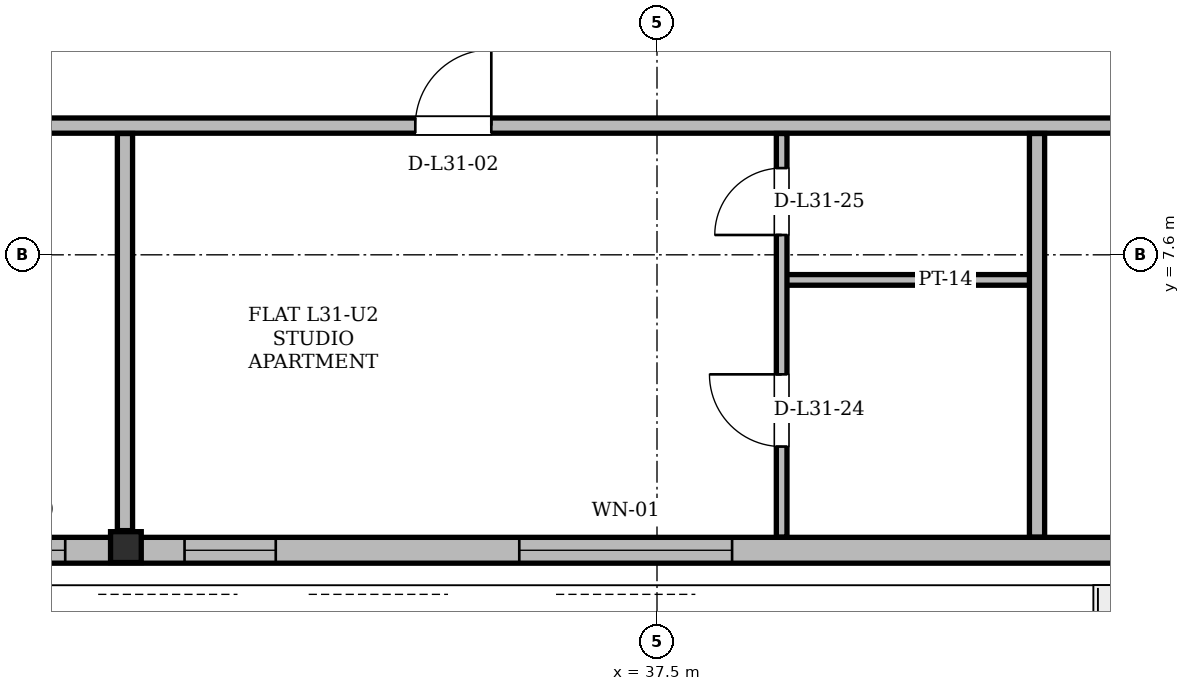
"""IFC4 building model, lengths in metres.
Left out: names, types, materials, properties, quantities, classifications, styles, units other than length and angle.
Written with IfcOpenShell. Run it as: python <this file> out.ifc"""

import sys

from ifc_helpers import new_model, si_unit, direction, frame, frame_2d, origin, origin_2d, place, context, subcontext, project, spatial, rectangle, i_section, extrude, element, fill, save


model = new_model("IFC4")
c1 = context("Model", 3, precision=1e-05, world=origin(), true_north=direction((0.0, 1.0)))
c2 = subcontext(c1, "Body", "Model", "MODEL_VIEW")
j1 = project(units=[si_unit("LENGTHUNIT", "METRE"), si_unit("PLANEANGLEUNIT", "RADIAN")], contexts=[c1])
p1 = place(None, origin())
s1 = spatial("IfcSite", under=j1, at=p1, CompositionType="ELEMENT")
p2 = place(p1, origin())
s2 = spatial("IfcBuilding", under=s1, at=p2, CompositionType="ELEMENT")
p3 = place(p2, frame((0.0, 0.0, 119.4)))
s3 = spatial("IfcBuildingStorey", under=s2, at=p3, CompositionType="ELEMENT", Elevation=119.4)
p4 = place(p3, frame((30.52, 3.713, 0.005), z_axis=(-0.00414597118, 0.023176658563, 0.999722788287), x_axis=(-0.984374005886, -0.176090364689, 0.0)))
e1 = element("IfcColumn", 1, at=p4, inside=s3, PredefinedType="COLUMN", context=c2, shape_type="SweptSolid", body=[
    extrude(i_section(OverallWidth=0.404, OverallDepth=0.406, WebThickness=0.027, FlangeThickness=0.044, at=origin_2d()), origin(), (0.0, 0.0, 1.0), 3.592),
])
p5 = place(p3, frame((20.049, 3.713, 0.0), z_axis=(0.0, 0.0, 1.0), x_axis=(1.0, 0.0, 0.0)))
e2 = element("IfcWall", 2, at=p5, inside=s3, PredefinedType="SOLIDWALL", context=c2, shape_type="SweptSolid", body=[
    extrude(rectangle(XDim=34.901, YDim=0.34, at=frame_2d((17.451, 0.0))), origin(), (0.0, 0.0, 1.0), 2.578),
])
p6 = place(p5, frame((6.369, 0.0, 0.0)))
e3 = element("IfcOpeningElement", 3, at=p6, cuts=e2, PredefinedType="OPENING", context=c2, shape_type="SweptSolid", body=[
    extrude(rectangle(XDim=1.5, YDim=2.2, at=frame_2d((0.75, 1.1))), frame((0.0, 0.17, 0.0), z_axis=(0.0, -1.0, 0.0), x_axis=(1.0, 0.0, 0.0)), (0.0, 0.0, 1.0), 0.34),
])
p7 = place(p5, frame((25.367, 0.0, 0.0)))
e4 = element("IfcOpeningElement", 4, at=p7, cuts=e2, PredefinedType="OPENING", context=c2, shape_type="SweptSolid", body=[
    extrude(rectangle(XDim=1.5, YDim=2.2, at=frame_2d((0.75, 1.1))), frame((0.0, 0.17, 0.0), z_axis=(0.0, -1.0, 0.0), x_axis=(1.0, 0.0, 0.0)), (0.0, 0.0, 1.0), 0.34),
])
p8 = place(p5, frame((2.388, 0.0, 0.85)))
e5 = element("IfcOpeningElement", 5, at=p8, cuts=e2, PredefinedType="OPENING", context=c2, shape_type="SweptSolid", body=[
    extrude(rectangle(XDim=1.6, YDim=1.618, at=frame_2d((0.8, 0.809))), frame((0.0, 0.17, 0.0), z_axis=(0.0, -1.0, 0.0), x_axis=(1.0, 0.0, 0.0)), (0.0, 0.0, 1.0), 0.34),
])
p9 = place(p5, frame((8.465, 0.0, 0.85)))
e6 = element("IfcOpeningElement", 6, at=p9, cuts=e2, PredefinedType="OPENING", context=c2, shape_type="SweptSolid", body=[
    extrude(rectangle(XDim=1.2, YDim=1.48, at=frame_2d((0.6, 0.74))), frame((0.0, 0.17, 0.0), z_axis=(0.0, -1.0, 0.0), x_axis=(1.0, 0.0, 0.0)), (0.0, 0.0, 1.0), 0.34),
])
p10 = place(p5, frame((11.235, 0.0, 0.85)))
e7 = element("IfcOpeningElement", 7, at=p10, cuts=e2, PredefinedType="OPENING", context=c2, shape_type="SweptSolid", body=[
    extrude(rectangle(XDim=1.2, YDim=1.48, at=frame_2d((0.6, 0.74))), frame((0.0, 0.17, 0.0), z_axis=(0.0, -1.0, 0.0), x_axis=(1.0, 0.0, 0.0)), (0.0, 0.0, 1.0), 0.34),
])
p11 = place(p5, frame((15.639, 0.0, 0.85)))
e8 = element("IfcOpeningElement", 8, at=p11, cuts=e2, PredefinedType="OPENING", context=c2, shape_type="SweptSolid", body=[
    extrude(rectangle(XDim=2.8, YDim=1.618, at=frame_2d((1.4, 0.809))), frame((0.0, 0.17, 0.0), z_axis=(0.0, -1.0, 0.0), x_axis=(1.0, 0.0, 0.0)), (0.0, 0.0, 1.0), 0.34),
])
p12 = place(p5, frame((30.113, 0.0, 0.85)))
e9 = element("IfcOpeningElement", 9, at=p12, cuts=e2, PredefinedType="OPENING", context=c2, shape_type="SweptSolid", body=[
    extrude(rectangle(XDim=2.2, YDim=1.618, at=frame_2d((1.1, 0.809))), frame((0.0, 0.17, 0.0), z_axis=(0.0, -1.0, 0.0), x_axis=(1.0, 0.0, 0.0)), (0.0, 0.0, 1.0), 0.34),
])
p13 = place(p3, frame((39.14, 7.27, 0.0), z_axis=(0.0, 0.0, 1.0), x_axis=(1.0, 0.0, 0.0)))
e10 = element("IfcWall", 10, at=p13, inside=s3, PredefinedType="PARTITIONING", context=c2, shape_type="SweptSolid", body=[
    extrude(rectangle(XDim=3.41, YDim=0.14, at=frame_2d((1.705, 0.0))), origin(), (0.0, 0.0, 1.0), 3.36),
])
p14 = place(p3, frame((19.6, 9.3, 0.0), z_axis=(0.0, 0.0, 1.0), x_axis=(1.0, 0.0, 0.0)))
e11 = element("IfcWall", 11, at=p14, inside=s3, PredefinedType="PARTITIONING", context=c2, shape_type="SweptSolid", body=[
    extrude(rectangle(XDim=30.4, YDim=0.2, at=frame_2d((15.2, 0.0))), origin(), (0.0, 0.0, 1.0), 2.814),
])
p15 = place(p14, frame((5.79, 0.0, 0.0)))
e12 = element("IfcOpeningElement", 12, at=p15, cuts=e11, PredefinedType="OPENING", context=c2, shape_type="SweptSolid", body=[
    extrude(rectangle(XDim=1.0, YDim=2.18, at=frame_2d((0.5, 1.09))), frame((0.0, 0.1, 0.0), z_axis=(0.0, -1.0, 0.0), x_axis=(1.0, 0.0, 0.0)), (0.0, 0.0, 1.0), 0.2),
])
p16 = place(p14, frame((14.72, 0.0, 0.0)))
e13 = element("IfcOpeningElement", 13, at=p16, cuts=e11, PredefinedType="OPENING", context=c2, shape_type="SweptSolid", body=[
    extrude(rectangle(XDim=1.0, YDim=2.18, at=frame_2d((0.5, 1.09))), frame((0.0, 0.1, 0.0), z_axis=(0.0, -1.0, 0.0), x_axis=(1.0, 0.0, 0.0)), (0.0, 0.0, 1.0), 0.2),
])
p17 = place(p14, frame((26.576, 0.0, 0.0)))
e14 = element("IfcOpeningElement", 14, at=p17, cuts=e11, PredefinedType="OPENING", context=c2, shape_type="SweptSolid", body=[
    extrude(rectangle(XDim=1.0, YDim=2.18, at=frame_2d((0.5, 1.09))), frame((0.0, 0.1, 0.0), z_axis=(0.0, -1.0, 0.0), x_axis=(1.0, 0.0, 0.0)), (0.0, 0.0, 1.0), 0.2),
])
p18 = place(p3, frame((30.5, 3.972, 0.0), z_axis=(0.0, 0.0, 1.0), x_axis=(0.0, 1.0, 0.0)))
e15 = element("IfcWall", 15, at=p18, inside=s3, PredefinedType="PARTITIONING", context=c2, shape_type="SweptSolid", body=[
    extrude(rectangle(XDim=5.224, YDim=0.2, at=frame_2d((2.612, 0.0))), origin(), (0.0, 0.0, 1.0), 3.36),
])
p19 = place(p3, frame((39.14, 3.887, 0.0), z_axis=(0.0, 0.0, 1.0), x_axis=(0.0, 1.0, 0.0)))
e16 = element("IfcWall", 16, at=p19, inside=s3, PredefinedType="PARTITIONING", context=c2, shape_type="SweptSolid", body=[
    extrude(rectangle(XDim=5.309, YDim=0.14, at=frame_2d((2.655, 0.0))), origin(), (0.0, 0.0, 1.0), 3.36),
])
p20 = place(p19, frame((1.19, 0.0, 0.0)))
e17 = element("IfcOpeningElement", 17, at=p20, cuts=e16, PredefinedType="OPENING", context=c2, shape_type="SweptSolid", body=[
    extrude(rectangle(XDim=0.95, YDim=2.1, at=frame_2d((0.475, 1.05))), frame((0.0, 0.07, 0.0), z_axis=(0.0, -1.0, 0.0), x_axis=(1.0, 0.0, 0.0)), (0.0, 0.0, 1.0), 0.14),
])
p21 = place(p19, frame((3.974, 0.0, 0.0)))
e18 = element("IfcOpeningElement", 18, at=p21, cuts=e16, PredefinedType="OPENING", context=c2, shape_type="SweptSolid", body=[
    extrude(rectangle(XDim=0.88, YDim=2.08, at=frame_2d((0.44, 1.04))), frame((0.0, 0.07, 0.0), z_axis=(0.0, -1.0, 0.0), x_axis=(1.0, 0.0, 0.0)), (0.0, 0.0, 1.0), 0.14),
])
p22 = place(p3, frame((42.5, 3.887, 0.0), z_axis=(0.0, 0.0, 1.0), x_axis=(0.0, 1.0, 0.0)))
e19 = element("IfcWall", 19, at=p22, inside=s3, PredefinedType="PARTITIONING", context=c2, shape_type="SweptSolid", body=[
    extrude(rectangle(XDim=5.309, YDim=0.2, at=frame_2d((2.655, 0.0))), origin(), (0.0, 0.0, 1.0), 2.946),
])
p23 = place(p9, origin())
e20 = element("IfcWindow", 20, at=p23, inside=s3, PartitioningType="SINGLE_PANEL", PredefinedType="WINDOW", context=c2, shape_type="SweptSolid", body=[
    extrude(rectangle(XDim=1.2, YDim=1.48, at=frame_2d((0.6, 0.74))), frame((0.0, 0.03, 0.0), z_axis=(0.0, -1.0, 0.0), x_axis=(1.0, 0.0, 0.0)), (0.0, 0.0, 1.0), 0.06),
])
fill(e6, e20)
p24 = place(p10, origin())
e21 = element("IfcWindow", 21, at=p24, inside=s3, PartitioningType="SINGLE_PANEL", PredefinedType="WINDOW", context=c2, shape_type="SweptSolid", body=[
    extrude(rectangle(XDim=1.2, YDim=1.48, at=frame_2d((0.6, 0.74))), frame((0.0, 0.03, 0.0), z_axis=(0.0, -1.0, 0.0), x_axis=(1.0, 0.0, 0.0)), (0.0, 0.0, 1.0), 0.06),
])
fill(e7, e21)
p25 = place(p11, origin())
e22 = element("IfcWindow", 22, at=p25, inside=s3, PartitioningType="SINGLE_PANEL", PredefinedType="WINDOW", context=c2, shape_type="SweptSolid", body=[
    extrude(rectangle(XDim=2.8, YDim=1.618, at=frame_2d((1.4, 0.809))), frame((0.0, 0.03, 0.0), z_axis=(0.0, -1.0, 0.0), x_axis=(1.0, 0.0, 0.0)), (0.0, 0.0, 1.0), 0.06),
])
fill(e8, e22)
p26 = place(p16, origin())
e23 = element("IfcDoor", 23, at=p26, inside=s3, OperationType="SINGLE_SWING_RIGHT", PredefinedType="DOOR", context=c2, shape_type="SweptSolid", body=[
    extrude(rectangle(XDim=1.0, YDim=2.18, at=frame_2d((0.5, 1.09))), frame((0.0, 0.025, 0.0), z_axis=(0.0, -1.0, 0.0), x_axis=(1.0, 0.0, 0.0)), (0.0, 0.0, 1.0), 0.05),
])
fill(e13, e23)
p27 = place(p20, origin())
e24 = element("IfcDoor", 24, at=p27, inside=s3, OperationType="SINGLE_SWING_RIGHT", PredefinedType="DOOR", context=c2, shape_type="SweptSolid", body=[
    extrude(rectangle(XDim=0.95, YDim=2.1, at=frame_2d((0.475, 1.05))), frame((0.0, 0.025, 0.0), z_axis=(0.0, -1.0, 0.0), x_axis=(1.0, 0.0, 0.0)), (0.0, 0.0, 1.0), 0.05),
])
fill(e17, e24)
p28 = place(p21, origin())
e25 = element("IfcDoor", 25, at=p28, inside=s3, OperationType="SINGLE_SWING_LEFT", PredefinedType="DOOR", context=c2, shape_type="SweptSolid", body=[
    extrude(rectangle(XDim=0.88, YDim=2.08, at=frame_2d((0.44, 1.04))), frame((0.0, 0.025, 0.0), z_axis=(0.0, -1.0, 0.0), x_axis=(1.0, 0.0, 0.0)), (0.0, 0.0, 1.0), 0.05),
])
fill(e18, e25)
save(model, sys.argv[1])
